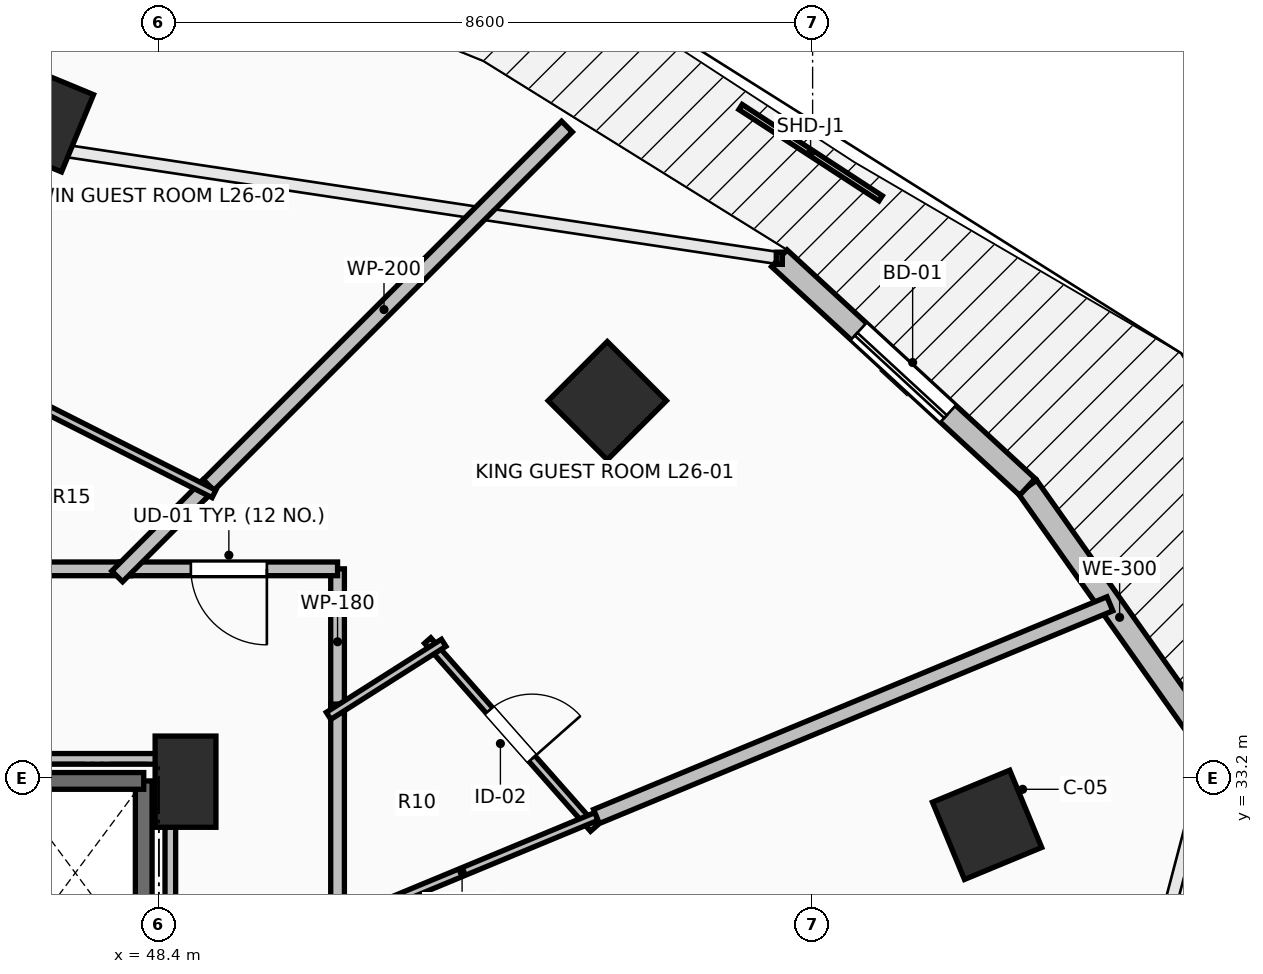
"""IFC4 building model, lengths in metres.
Left out: names, types, materials, properties, quantities, classifications, styles, units other than length and angle.
Written with IfcOpenShell. Run it as: python <this file> out.ifc"""

import sys

from ifc_helpers import new_model, si_unit, direction, frame, frame_2d, origin, origin_2d, place, context, subcontext, project, spatial, rectangle, extrude, element, fill, save


model = new_model("IFC4")
c1 = context("Model", 3, precision=1e-05, world=origin(), true_north=direction((0.0, 1.0)))
c2 = subcontext(c1, "Body", "Model", "MODEL_VIEW")
j1 = project(units=[si_unit("LENGTHUNIT", "METRE"), si_unit("PLANEANGLEUNIT", "RADIAN")], contexts=[c1])
p1 = place(None, origin())
s1 = spatial("IfcSite", under=j1, at=p1, CompositionType="ELEMENT")
p2 = place(p1, origin())
s2 = spatial("IfcBuilding", under=s1, at=p2, CompositionType="ELEMENT")
p3 = place(p2, frame((0.0, 0.0, 99.8)))
s3 = spatial("IfcBuildingStorey", under=s2, at=p3, CompositionType="ELEMENT", Elevation=99.8)
for number, where, z_axis, x_axis in (
    (1, (59.295, 32.582, 0.0), (0.0, 0.0, 1.0), (0.924, 0.383, 0.0)),
    (2, (54.299, 38.162, 0.0), (0.0, 0.0, 1.0), (0.707, 0.707, 0.0)),
    (3, (46.821, 41.891, 0.0), (0.0, 0.0, 1.0), (0.383, 0.924, 0.0)),
):
    element("IfcColumn", number, at=place(p3, frame(where, z_axis=z_axis, x_axis=x_axis)), inside=s3, PredefinedType="COLUMN", context=c2, shape_type="SweptSolid", body=[
        extrude(rectangle(XDim=1.1, YDim=1.1, at=origin_2d()), origin(), (0.0, 0.0, 1.0), 3.5),
    ])
p4 = place(p3, frame((48.75, 33.15, 0.0), z_axis=(0.0, 0.0, 1.0), x_axis=(1.0, 0.0, 0.0)))
e4 = element("IfcColumn", 4, at=p4, inside=s3, PredefinedType="PILASTER", context=c2, shape_type="SweptSolid", body=[
    extrude(rectangle(XDim=0.8, YDim=1.2, at=origin_2d()), origin(), (0.0, 0.0, 1.0), 3.5),
])
p5 = place(p3, frame((62.252, 33.596, 0.0), z_axis=(0.0, 0.0, 1.0), x_axis=(-0.57716435238, 0.81662801222, 0.0)))
e5 = element("IfcWall", 5, at=p5, inside=s3, PredefinedType="STANDARD", context=c2, shape_type="SweptSolid", body=[
    extrude(rectangle(XDim=4.202, YDim=0.3, at=frame_2d((2.101, 0.0))), origin(), (0.0, 0.0, 1.0), 3.24),
])
p6 = place(p3, frame((59.826, 37.028, 0.0), z_axis=(0.0, 0.0, 1.0), x_axis=(-0.735416718093, 0.677615119924, 0.0)))
e6 = element("IfcWall", 6, at=p6, inside=s3, PredefinedType="STANDARD", context=c2, shape_type="SweptSolid", body=[
    extrude(rectangle(XDim=4.439, YDim=0.3, at=frame_2d((2.22, 0.0))), origin(), (0.0, 0.0, 1.0), 3.24),
])
p7 = place(p6, frame((1.419, 0.0, 0.0)))
e7 = element("IfcOpeningElement", 7, at=p7, cuts=e6, PredefinedType="OPENING", context=c2, shape_type="SweptSolid", body=[
    extrude(rectangle(XDim=1.6, YDim=2.3, at=frame_2d((0.8, 1.15))), frame((0.0, 0.165, 0.0), z_axis=(0.0, -1.0, 0.0), x_axis=(1.0, 0.0, 0.0)), (0.0, 0.0, 1.0), 0.33),
])
p8 = place(p3, frame((48.2, 30.74, 0.0), z_axis=(0.0, 0.0, 1.0), x_axis=(0.0, 1.0, 0.0)))
e8 = element("IfcWall", 8, at=p8, inside=s3, PredefinedType="SOLIDWALL", context=c2, shape_type="SweptSolid", body=[
    extrude(rectangle(XDim=2.42, YDim=0.22, at=frame_2d((1.21, 0.0))), origin(), (0.0, 0.0, 1.0), 3.24),
])
p9 = place(p3, frame((48.2, 33.16, 0.0), z_axis=(0.0, 0.0, 1.0), x_axis=(-1.0, 0.0, 0.0)))
e9 = element("IfcWall", 9, at=p9, inside=s3, PredefinedType="SOLIDWALL", context=c2, shape_type="SweptSolid", body=[
    extrude(rectangle(XDim=1.8, YDim=0.22, at=frame_2d((0.9, 0.0))), origin(), (0.0, 0.0, 1.0), 3.24),
])
p10 = place(p3, frame((50.75, 34.031, 0.0), z_axis=(0.0, 0.0, 1.0), x_axis=(0.0, 1.0, 0.0)))
e10 = element("IfcWall", 10, at=p10, inside=s3, PredefinedType="PARTITIONING", context=c2, shape_type="SweptSolid", body=[
    extrude(rectangle(XDim=1.919, YDim=0.18, at=frame_2d((0.959, 0.0))), origin(), (0.0, 0.0, 1.0), 2.432),
])
p11 = place(p3, frame((50.75, 35.95, 0.0), z_axis=(0.0, 0.0, 1.0), x_axis=(-1.0, 0.0, 0.0)))
e11 = element("IfcWall", 11, at=p11, inside=s3, PredefinedType="PARTITIONING", context=c2, shape_type="SweptSolid", body=[
    extrude(rectangle(XDim=2.86, YDim=0.18, at=frame_2d((1.43, 0.0))), origin(), (0.0, 0.0, 1.0), 2.432),
])
p12 = place(p11, frame((0.93, 0.0, 0.0)))
e12 = element("IfcOpeningElement", 12, at=p12, cuts=e11, PredefinedType="OPENING", context=c2, shape_type="SweptSolid", body=[
    extrude(rectangle(XDim=1.0, YDim=2.15, at=frame_2d((0.5, 1.075))), frame((0.0, 0.105, 0.0), z_axis=(0.0, -1.0, 0.0), x_axis=(1.0, 0.0, 0.0)), (0.0, 0.0, 1.0), 0.21),
])
p13 = place(p3, frame((50.75, 31.081, 0.0), z_axis=(0.0, 0.0, 1.0), x_axis=(0.0, 1.0, 0.0)))
e13 = element("IfcWall", 13, at=p13, inside=s3, PredefinedType="PARTITIONING", context=c2, shape_type="SweptSolid", body=[
    extrude(rectangle(XDim=3.09, YDim=0.18, at=frame_2d((1.545, 0.0))), origin(), (0.0, 0.0, 1.0), 2.432),
])
p14 = place(p3, frame((48.03, 35.95, 0.0), z_axis=(0.0, 0.0, 1.0), x_axis=(-1.0, 0.0, 0.0)))
e14 = element("IfcWall", 14, at=p14, inside=s3, PredefinedType="PARTITIONING", context=c2, shape_type="SweptSolid", body=[
    extrude(rectangle(XDim=3.104, YDim=0.18, at=frame_2d((1.552, 0.0))), origin(), (0.0, 0.0, 1.0), 2.432),
])
p15 = place(p3, frame((51.935, 35.007, 0.0), z_axis=(0.0, 0.0, 1.0), x_axis=(0.662059609276, -0.749451181709, 0.0)))
e15 = element("IfcWall", 15, at=p15, inside=s3, PredefinedType="PARTITIONING", context=c2, shape_type="SweptSolid", body=[
    extrude(rectangle(XDim=3.299, YDim=0.11, at=frame_2d((1.65, 0.0))), origin(), (0.0, 0.0, 1.0), 2.432),
])
p16 = place(p15, frame((1.225, 0.0, 0.0)))
e16 = element("IfcOpeningElement", 16, at=p16, cuts=e15, PredefinedType="OPENING", context=c2, shape_type="SweptSolid", body=[
    extrude(rectangle(XDim=0.85, YDim=2.1, at=frame_2d((0.425, 1.05))), frame((0.0, 0.07, 0.0), z_axis=(0.0, -1.0, 0.0), x_axis=(1.0, 0.0, 0.0)), (0.0, 0.0, 1.0), 0.14),
])
p17 = place(p3, frame((54.156, 32.693, 0.0), z_axis=(0.0, 0.0, 1.0), x_axis=(-0.923803754276, -0.382866326002, 0.0)))
e17 = element("IfcWall", 17, at=p17, inside=s3, PredefinedType="PARTITIONING", context=c2, shape_type="SweptSolid", body=[
    extrude(rectangle(XDim=3.827, YDim=0.11, at=frame_2d((1.914, 0.0))), origin(), (0.0, 0.0, 1.0), 2.432),
])
p18 = place(p3, frame((50.632, 34.016, 0.0), z_axis=(0.0, 0.0, 1.0), x_axis=(0.844361394482, 0.535774052665, 0.0)))
e18 = element("IfcWall", 18, at=p18, inside=s3, PredefinedType="PARTITIONING", context=c2, shape_type="SweptSolid", body=[
    extrude(rectangle(XDim=1.793, YDim=0.11, at=frame_2d((0.897, 0.0))), origin(), (0.0, 0.0, 1.0), 2.886),
])
p19 = place(p3, frame((53.768, 41.768, 0.0), z_axis=(0.0, 0.0, 1.0), x_axis=(-0.707106781187, -0.707106781187, 0.0)))
e19 = element("IfcWall", 19, at=p19, inside=s3, PredefinedType="PARTITIONING", context=c2, shape_type="SweptSolid", body=[
    extrude(rectangle(XDim=6.808, YDim=0.2, at=frame_2d((3.404, 0.0))), origin(), (0.0, 0.0, 1.0), 2.677),
])
p20 = place(p3, frame((49.053, 37.053, 0.0), z_axis=(0.0, 0.0, 1.0), x_axis=(-0.707106781187, -0.707106781187, 0.0)))
e20 = element("IfcWall", 20, at=p20, inside=s3, PredefinedType="PARTITIONING", context=c2, shape_type="SweptSolid", body=[
    extrude(rectangle(XDim=1.7, YDim=0.2, at=frame_2d((0.85, 0.0))), origin(), (0.0, 0.0, 1.0), 2.432),
])
p21 = place(p3, frame((54.156, 32.692, 0.0), z_axis=(0.0, 0.0, 1.0), x_axis=(0.923875192571, 0.38269390974, 0.0)))
e21 = element("IfcWall", 21, at=p21, inside=s3, PredefinedType="PARTITIONING", context=c2, shape_type="SweptSolid", body=[
    extrude(rectangle(XDim=7.311, YDim=0.2, at=frame_2d((3.656, 0.0))), origin(), (0.0, 0.0, 1.0), 2.432),
])
p22 = place(p3, frame((46.462, 38.281, 0.0), z_axis=(0.0, 0.0, 1.0), x_axis=(0.892486842203, -0.451073426944, 0.0)))
e22 = element("IfcWall", 22, at=p22, inside=s3, PredefinedType="PARTITIONING", context=c2, shape_type="SweptSolid", body=[
    extrude(rectangle(XDim=2.982, YDim=0.11, at=frame_2d((1.491, 0.0))), origin(), (0.0, 0.0, 1.0), 2.432),
])
p23 = place(p3, frame((44.34, 33.45, 0.0), z_axis=(0.0, 0.0, 1.0), x_axis=(1.0, 0.0, 0.0)))
e23 = element("IfcWall", 23, at=p23, inside=s3, PredefinedType="PARTITIONING", context=c2, shape_type="SweptSolid", body=[
    extrude(rectangle(XDim=4.21, YDim=0.14, at=frame_2d((2.105, 0.0))), origin(), (0.0, 0.0, 1.0), 2.432),
])
p24 = place(p3, frame((48.55, 33.45, 0.0), z_axis=(0.0, 0.0, 1.0), x_axis=(0.0, -1.0, 0.0)))
e24 = element("IfcWall", 24, at=p24, inside=s3, PredefinedType="PARTITIONING", context=c2, shape_type="SweptSolid", body=[
    extrude(rectangle(XDim=5.254, YDim=0.14, at=frame_2d((2.627, 0.0))), origin(), (0.0, 0.0, 1.0), 2.432),
])
p25 = place(p7, origin())
e25 = element("IfcDoor", 25, at=p25, inside=s3, OperationType="SLIDING_TO_LEFT", PredefinedType="DOOR", context=c2, shape_type="SweptSolid", body=[
    extrude(rectangle(XDim=1.6, YDim=2.3, at=frame_2d((0.8, 1.15))), frame((0.0, 0.025, 0.0), z_axis=(0.0, -1.0, 0.0), x_axis=(1.0, 0.0, 0.0)), (0.0, 0.0, 1.0), 0.05),
])
fill(e7, e25)
p26 = place(p12, origin())
e26 = element("IfcDoor", 26, at=p26, inside=s3, OperationType="SINGLE_SWING_LEFT", PredefinedType="DOOR", context=c2, shape_type="SweptSolid", body=[
    extrude(rectangle(XDim=1.0, YDim=2.15, at=frame_2d((0.5, 1.075))), frame((0.0, 0.025, 0.0), z_axis=(0.0, -1.0, 0.0), x_axis=(1.0, 0.0, 0.0)), (0.0, 0.0, 1.0), 0.05),
])
fill(e12, e26)
p27 = place(p16, origin())
e27 = element("IfcDoor", 27, at=p27, inside=s3, OperationType="SINGLE_SWING_RIGHT", PredefinedType="DOOR", context=c2, shape_type="SweptSolid", body=[
    extrude(rectangle(XDim=0.85, YDim=2.1, at=frame_2d((0.425, 1.05))), frame((0.0, 0.025, 0.0), z_axis=(0.0, -1.0, 0.0), x_axis=(1.0, 0.0, 0.0)), (0.0, 0.0, 1.0), 0.05),
])
fill(e16, e27)
save(model, sys.argv[1])
